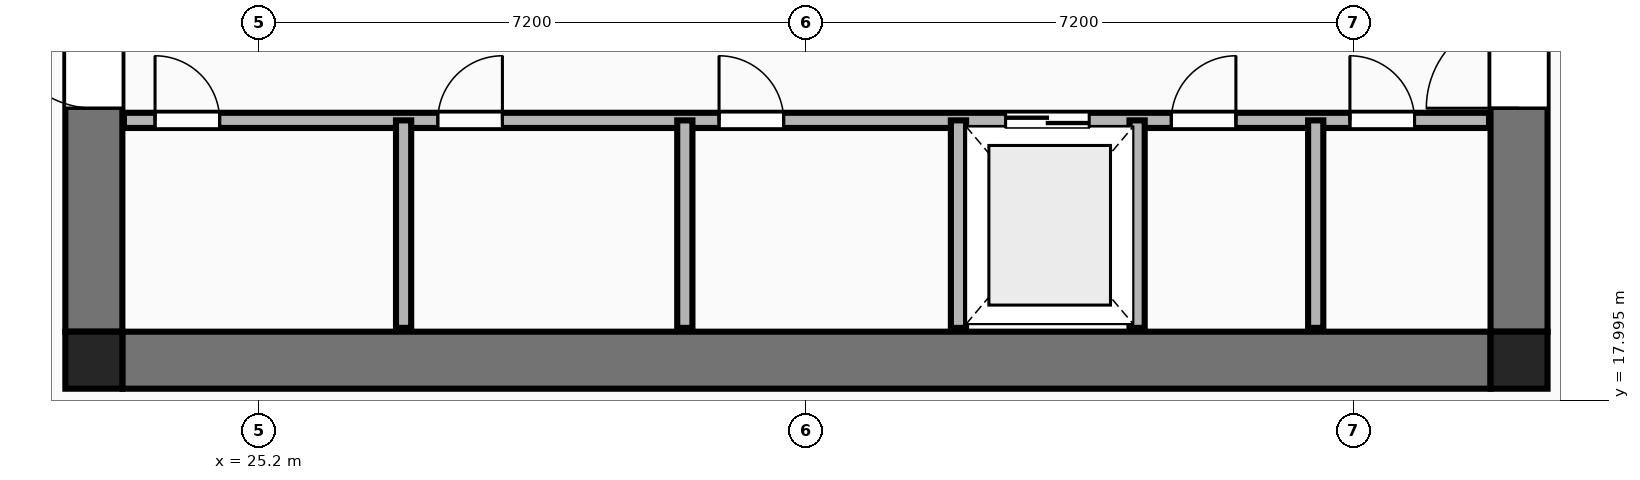
"""IFC4 building model, lengths in metres.
Left out: names, types, materials, properties, quantities, classifications, styles, units other than length and angle.
Written with IfcOpenShell. Run it as: python <this file> out.ifc"""

import sys

from ifc_helpers import new_model, si_unit, direction, frame, frame_2d, origin, origin_2d, place, context, subcontext, project, spatial, rectangle, extrude, element, fill, save


model = new_model("IFC4")
c1 = context("Model", 3, precision=1e-05, world=origin(), true_north=direction((0.0, 1.0)))
c2 = subcontext(c1, "Body", "Model", "MODEL_VIEW")
j1 = project(units=[si_unit("LENGTHUNIT", "METRE"), si_unit("PLANEANGLEUNIT", "RADIAN")], contexts=[c1])
p1 = place(None, origin())
s1 = spatial("IfcSite", under=j1, at=p1, CompositionType="ELEMENT")
p2 = place(p1, origin())
s2 = spatial("IfcBuilding", under=s1, at=p2, CompositionType="ELEMENT")
p3 = place(p2, frame((0.0, 0.0, 141.0)))
s3 = spatial("IfcBuildingStorey", under=s2, at=p3, CompositionType="ELEMENT", Elevation=141.0)
for number, where, z_axis, x_axis in (
    (1, (23.025, 18.525, 0.0), (0.0, 0.0, 1.0), (1.0, 0.0, 0.0)),
    (2, (41.775, 18.525, 0.0), (0.0, 0.0, 1.0), (1.0, 0.0, 0.0)),
):
    element("IfcColumn", number, at=place(p3, frame(where, z_axis=z_axis, x_axis=x_axis)), inside=s3, PredefinedType="COLUMN", context=c2, shape_type="SweptSolid", body=[
        extrude(rectangle(XDim=0.75, YDim=0.75, at=origin_2d()), origin(), (0.0, 0.0, 1.0), 3.55),
    ])
p4 = place(p3, frame((23.4, 18.525, 0.0), z_axis=(0.0, 0.0, 1.0), x_axis=(1.0, 0.0, 0.0)))
e3 = element("IfcWall", 3, at=p4, inside=s3, PredefinedType="SHEAR", context=c2, shape_type="SweptSolid", body=[
    extrude(rectangle(XDim=18.0, YDim=0.75, at=frame_2d((9.0, 0.0))), origin(), (0.0, 0.0, 1.0), 3.34),
])
p5 = place(p3, frame((23.025, 18.9, 0.0), z_axis=(0.0, 0.0, 1.0), x_axis=(0.0, 1.0, 0.0)))
e4 = element("IfcWall", 4, at=p5, inside=s3, PredefinedType="SHEAR", context=c2, shape_type="SweptSolid", body=[
    extrude(rectangle(XDim=14.0, YDim=0.75, at=frame_2d((7.0, 0.0))), origin(), (0.0, 0.0, 1.0), 3.34),
])
p6 = place(p5, frame((2.94, 0.0, 0.0)))
e5 = element("IfcOpeningElement", 5, at=p6, cuts=e4, PredefinedType="OPENING", context=c2, shape_type="SweptSolid", body=[
    extrude(rectangle(XDim=1.22, YDim=2.25, at=frame_2d((0.61, 1.125))), frame((0.0, 0.385, 0.0), z_axis=(0.0, -1.0, 0.0), x_axis=(1.0, 0.0, 0.0)), (0.0, 0.0, 1.0), 0.77),
])
p7 = place(p3, frame((41.775, 18.9, 0.0), z_axis=(0.0, 0.0, 1.0), x_axis=(0.0, 1.0, 0.0)))
e6 = element("IfcWall", 6, at=p7, inside=s3, PredefinedType="SHEAR", context=c2, shape_type="SweptSolid", body=[
    extrude(rectangle(XDim=14.0, YDim=0.75, at=frame_2d((7.0, 0.0))), origin(), (0.0, 0.0, 1.0), 3.34),
])
p8 = place(p7, frame((2.94, 0.0, 0.0)))
e7 = element("IfcOpeningElement", 7, at=p8, cuts=e6, PredefinedType="OPENING", context=c2, shape_type="SweptSolid", body=[
    extrude(rectangle(XDim=1.22, YDim=2.25, at=frame_2d((0.61, 1.125))), frame((0.0, 0.385, 0.0), z_axis=(0.0, -1.0, 0.0), x_axis=(1.0, 0.0, 0.0)), (0.0, 0.0, 1.0), 0.77),
])
p9 = place(p3, frame((23.42, 21.68, 0.0), z_axis=(0.0, 0.0, 1.0), x_axis=(1.0, 0.0, 0.0)))
e8 = element("IfcWall", 8, at=p9, inside=s3, PredefinedType="PLUMBINGWALL", context=c2, shape_type="SweptSolid", body=[
    extrude(rectangle(XDim=17.96, YDim=0.2, at=frame_2d((8.98, 0.0))), origin(), (0.0, 0.0, 1.0), 3.34),
])
p10 = place(p9, frame((11.6, 0.0, 0.0)))
e9 = element("IfcOpeningElement", 9, at=p10, cuts=e8, PredefinedType="OPENING", context=c2, shape_type="SweptSolid", body=[
    extrude(rectangle(XDim=1.1, YDim=2.2, at=frame_2d((0.55, 1.1))), frame((0.0, 0.11, 0.0), z_axis=(0.0, -1.0, 0.0), x_axis=(1.0, 0.0, 0.0)), (0.0, 0.0, 1.0), 0.22),
])
p11 = place(p9, frame((0.41, 0.0, 0.0)))
e10 = element("IfcOpeningElement", 10, at=p11, cuts=e8, PredefinedType="OPENING", context=c2, shape_type="SweptSolid", body=[
    extrude(rectangle(XDim=0.85, YDim=2.05, at=frame_2d((0.425, 1.025))), frame((0.0, 0.11, 0.0), z_axis=(0.0, -1.0, 0.0), x_axis=(1.0, 0.0, 0.0)), (0.0, 0.0, 1.0), 0.22),
])
p12 = place(p9, frame((4.13, 0.0, 0.0)))
e11 = element("IfcOpeningElement", 11, at=p12, cuts=e8, PredefinedType="OPENING", context=c2, shape_type="SweptSolid", body=[
    extrude(rectangle(XDim=0.85, YDim=2.05, at=frame_2d((0.425, 1.025))), frame((0.0, 0.11, 0.0), z_axis=(0.0, -1.0, 0.0), x_axis=(1.0, 0.0, 0.0)), (0.0, 0.0, 1.0), 0.22),
])
p13 = place(p9, frame((7.83, 0.0, 0.0)))
e12 = element("IfcOpeningElement", 12, at=p13, cuts=e8, PredefinedType="OPENING", context=c2, shape_type="SweptSolid", body=[
    extrude(rectangle(XDim=0.85, YDim=2.05, at=frame_2d((0.425, 1.025))), frame((0.0, 0.11, 0.0), z_axis=(0.0, -1.0, 0.0), x_axis=(1.0, 0.0, 0.0)), (0.0, 0.0, 1.0), 0.22),
])
p14 = place(p9, frame((13.78, 0.0, 0.0)))
e13 = element("IfcOpeningElement", 13, at=p14, cuts=e8, PredefinedType="OPENING", context=c2, shape_type="SweptSolid", body=[
    extrude(rectangle(XDim=0.85, YDim=2.05, at=frame_2d((0.425, 1.025))), frame((0.0, 0.11, 0.0), z_axis=(0.0, -1.0, 0.0), x_axis=(1.0, 0.0, 0.0)), (0.0, 0.0, 1.0), 0.22),
])
p15 = place(p9, frame((16.13, 0.0, 0.0)))
e14 = element("IfcOpeningElement", 14, at=p15, cuts=e8, PredefinedType="OPENING", context=c2, shape_type="SweptSolid", body=[
    extrude(rectangle(XDim=0.85, YDim=2.05, at=frame_2d((0.425, 1.025))), frame((0.0, 0.11, 0.0), z_axis=(0.0, -1.0, 0.0), x_axis=(1.0, 0.0, 0.0)), (0.0, 0.0, 1.0), 0.22),
])
for number, where, z_axis, x_axis in (
    (15, (34.4, 18.95, 0.0), (0.0, 0.0, 1.0), (0.0, 1.0, 0.0)),
    (16, (36.75, 18.95, 0.0), (0.0, 0.0, 1.0), (0.0, 1.0, 0.0)),
    (17, (27.1, 18.95, 0.0), (0.0, 0.0, 1.0), (0.0, 1.0, 0.0)),
    (18, (30.8, 18.95, 0.0), (0.0, 0.0, 1.0), (0.0, 1.0, 0.0)),
    (19, (39.1, 18.95, 0.0), (0.0, 0.0, 1.0), (0.0, 1.0, 0.0)),
):
    element("IfcWall", number, at=place(p3, frame(where, z_axis=z_axis, x_axis=x_axis)), inside=s3, PredefinedType="PLUMBINGWALL", context=c2, shape_type="SweptSolid", body=[
        extrude(rectangle(XDim=2.73, YDim=0.2, at=frame_2d((1.365, 0.0))), origin(), (0.0, 0.0, 1.0), 3.34),
    ])
p16 = place(p6, origin())
e20 = element("IfcDoor", 20, at=p16, inside=s3, OperationType="SINGLE_SWING_RIGHT", PredefinedType="DOOR", context=c2, shape_type="SweptSolid", body=[
    extrude(rectangle(XDim=1.22, YDim=2.25, at=frame_2d((0.61, 1.125))), frame((0.0, 0.025, 0.0), z_axis=(0.0, -1.0, 0.0), x_axis=(1.0, 0.0, 0.0)), (0.0, 0.0, 1.0), 0.05),
])
fill(e5, e20)
p17 = place(p8, origin())
e21 = element("IfcDoor", 21, at=p17, inside=s3, OperationType="SINGLE_SWING_LEFT", PredefinedType="DOOR", context=c2, shape_type="SweptSolid", body=[
    extrude(rectangle(XDim=1.22, YDim=2.25, at=frame_2d((0.61, 1.125))), frame((0.0, 0.025, 0.0), z_axis=(0.0, -1.0, 0.0), x_axis=(1.0, 0.0, 0.0)), (0.0, 0.0, 1.0), 0.05),
])
fill(e7, e21)
p18 = place(p10, origin())
e22 = element("IfcDoor", 22, at=p18, inside=s3, OperationType="DOUBLE_DOOR_SLIDING", PredefinedType="DOOR", context=c2, shape_type="SweptSolid", body=[
    extrude(rectangle(XDim=1.1, YDim=2.2, at=frame_2d((0.55, 1.1))), frame((0.0, 0.025, 0.0), z_axis=(0.0, -1.0, 0.0), x_axis=(1.0, 0.0, 0.0)), (0.0, 0.0, 1.0), 0.05),
])
fill(e9, e22)
p19 = place(p11, origin())
e23 = element("IfcDoor", 23, at=p19, inside=s3, OperationType="SINGLE_SWING_LEFT", PredefinedType="DOOR", context=c2, shape_type="SweptSolid", body=[
    extrude(rectangle(XDim=0.85, YDim=2.05, at=frame_2d((0.425, 1.025))), frame((0.0, 0.025, 0.0), z_axis=(0.0, -1.0, 0.0), x_axis=(1.0, 0.0, 0.0)), (0.0, 0.0, 1.0), 0.05),
])
fill(e10, e23)
p20 = place(p12, origin())
e24 = element("IfcDoor", 24, at=p20, inside=s3, OperationType="SINGLE_SWING_RIGHT", PredefinedType="DOOR", context=c2, shape_type="SweptSolid", body=[
    extrude(rectangle(XDim=0.85, YDim=2.05, at=frame_2d((0.425, 1.025))), frame((0.0, 0.025, 0.0), z_axis=(0.0, -1.0, 0.0), x_axis=(1.0, 0.0, 0.0)), (0.0, 0.0, 1.0), 0.05),
])
fill(e11, e24)
p21 = place(p13, origin())
e25 = element("IfcDoor", 25, at=p21, inside=s3, OperationType="SINGLE_SWING_LEFT", PredefinedType="DOOR", context=c2, shape_type="SweptSolid", body=[
    extrude(rectangle(XDim=0.85, YDim=2.05, at=frame_2d((0.425, 1.025))), frame((0.0, 0.025, 0.0), z_axis=(0.0, -1.0, 0.0), x_axis=(1.0, 0.0, 0.0)), (0.0, 0.0, 1.0), 0.05),
])
fill(e12, e25)
p22 = place(p14, origin())
e26 = element("IfcDoor", 26, at=p22, inside=s3, OperationType="SINGLE_SWING_RIGHT", PredefinedType="DOOR", context=c2, shape_type="SweptSolid", body=[
    extrude(rectangle(XDim=0.85, YDim=2.05, at=frame_2d((0.425, 1.025))), frame((0.0, 0.025, 0.0), z_axis=(0.0, -1.0, 0.0), x_axis=(1.0, 0.0, 0.0)), (0.0, 0.0, 1.0), 0.05),
])
fill(e13, e26)
p23 = place(p15, origin())
e27 = element("IfcDoor", 27, at=p23, inside=s3, OperationType="SINGLE_SWING_LEFT", PredefinedType="DOOR", context=c2, shape_type="SweptSolid", body=[
    extrude(rectangle(XDim=0.85, YDim=2.05, at=frame_2d((0.425, 1.025))), frame((0.0, 0.025, 0.0), z_axis=(0.0, -1.0, 0.0), x_axis=(1.0, 0.0, 0.0)), (0.0, 0.0, 1.0), 0.05),
])
fill(e14, e27)
save(model, sys.argv[1])
